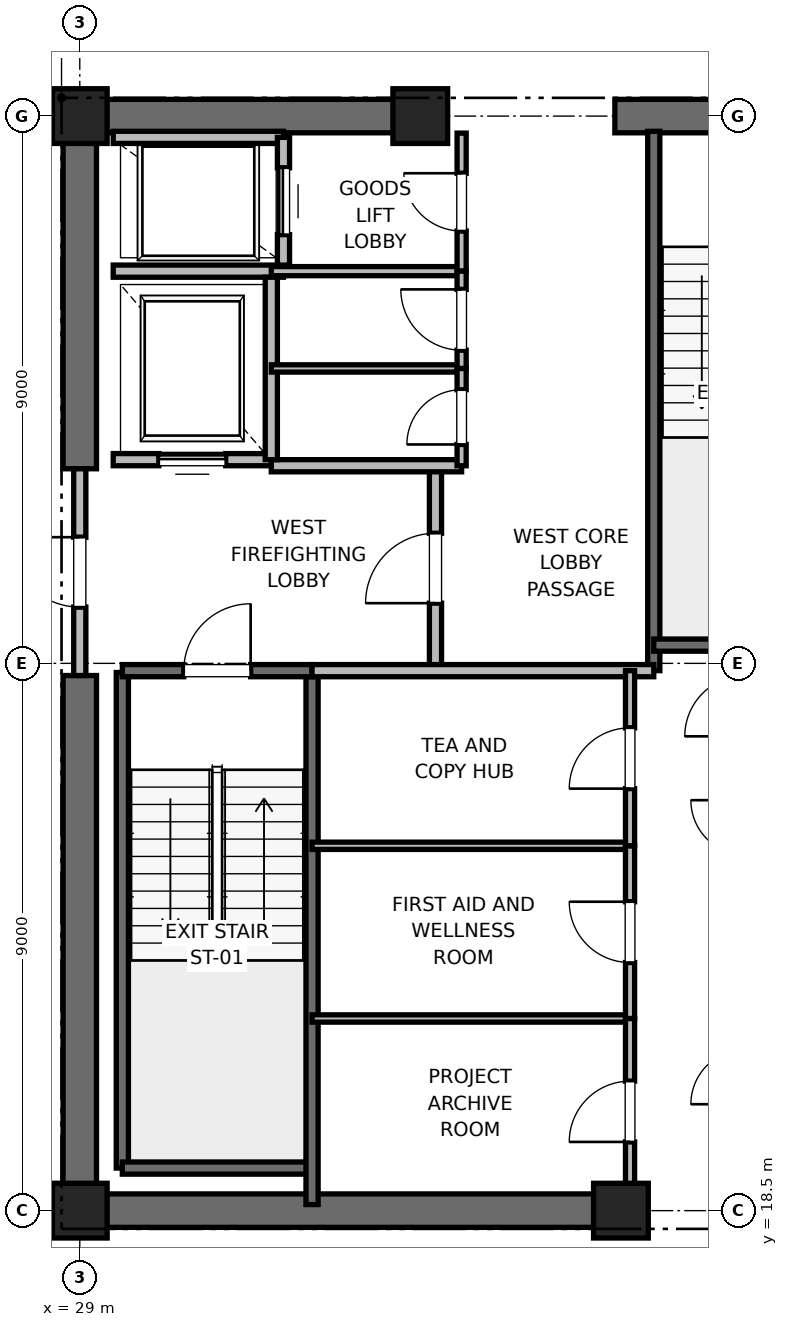
"""IFC4 building model, lengths in metres.
Left out: names, types, materials, properties, quantities, classifications, styles, units other than length and angle.
Written with IfcOpenShell. Run it as: python <this file> out.ifc"""

import sys

from ifc_helpers import new_model, si_unit, direction, frame, frame_2d, origin, origin_2d, place, context, subcontext, project, spatial, rectangle, extrude, element, fill, save


model = new_model("IFC4")
c1 = context("Model", 3, precision=1e-05, world=origin(), true_north=direction((0.0, 1.0)))
c2 = subcontext(c1, "Body", "Model", "MODEL_VIEW")
j1 = project(units=[si_unit("LENGTHUNIT", "METRE"), si_unit("PLANEANGLEUNIT", "RADIAN")], contexts=[c1])
p1 = place(None, origin())
s1 = spatial("IfcSite", under=j1, at=p1, CompositionType="ELEMENT")
p2 = place(p1, origin())
s2 = spatial("IfcBuilding", under=s1, at=p2, CompositionType="ELEMENT")
p3 = place(p2, frame((0.0, 0.0, 209.2)))
s3 = spatial("IfcBuildingStorey", under=s2, at=p3, CompositionType="ELEMENT", Elevation=209.2)
for number, where, z_axis, x_axis in (
    (1, (29.0, 18.5, 0.0), (0.0, 0.0, 1.0), (1.0, 0.0, 0.0)),
    (2, (29.0, 36.5, 0.0), (0.0, 0.0, 1.0), (1.0, 0.0, 0.0)),
    (3, (37.9, 18.5, 0.0), (0.0, 0.0, 1.0), (1.0, 0.0, 0.0)),
    (4, (34.6, 36.5, 0.0), (0.0, 0.0, 1.0), (1.0, 0.0, 0.0)),
):
    element("IfcColumn", number, at=place(p3, frame(where, z_axis=z_axis, x_axis=x_axis)), inside=s3, PredefinedType="PILASTER", context=c2, shape_type="SweptSolid", body=[
        extrude(rectangle(XDim=0.9, YDim=0.9, at=origin_2d()), origin(), (0.0, 0.0, 1.0), 4.0),
    ])
p4 = place(p3, frame((29.0, 18.5, 0.0), z_axis=(0.0, 0.0, 1.0), x_axis=(1.0, 0.0, 0.0)))
e5 = element("IfcWall", 5, at=p4, inside=s3, PredefinedType="SHEAR", context=c2, shape_type="SweptSolid", body=[
    extrude(rectangle(XDim=9.2, YDim=0.55, at=frame_2d((4.6, 0.0))), origin(), (0.0, 0.0, 1.0), 3.775),
])
p5 = place(p3, frame((29.0, 36.5, 0.0), z_axis=(0.0, 0.0, 1.0), x_axis=(1.0, 0.0, 0.0)))
e6 = element("IfcWall", 6, at=p5, inside=s3, PredefinedType="SHEAR", context=c2, shape_type="SweptSolid", body=[
    extrude(rectangle(XDim=5.8, YDim=0.55, at=frame_2d((2.9, 0.0))), origin(), (0.0, 0.0, 1.0), 3.775),
])
p6 = place(p3, frame((37.8, 36.5, 0.0), z_axis=(0.0, 0.0, 1.0), x_axis=(1.0, 0.0, 0.0)))
e7 = element("IfcWall", 7, at=p6, inside=s3, PredefinedType="SHEAR", context=c2, shape_type="SweptSolid", body=[
    extrude(rectangle(XDim=4.4, YDim=0.55, at=frame_2d((2.2, 0.0))), origin(), (0.0, 0.0, 1.0), 3.775),
])
p7 = place(p6, frame((1.65, 0.0, 0.0)))
e8 = element("IfcOpeningElement", 8, at=p7, cuts=e7, PredefinedType="OPENING", context=c2, shape_type="SweptSolid", body=[
    extrude(rectangle(XDim=1.1, YDim=2.15, at=frame_2d((0.55, 1.075))), frame((0.0, 0.275, 0.0), z_axis=(0.0, -1.0, 0.0), x_axis=(1.0, 0.0, 0.0)), (0.0, 0.0, 1.0), 0.55),
])
p8 = place(p3, frame((29.0, 18.5, 0.0), z_axis=(0.0, 0.0, 1.0), x_axis=(0.0, 1.0, 0.0)))
e9 = element("IfcWall", 9, at=p8, inside=s3, PredefinedType="SHEAR", context=c2, shape_type="SweptSolid", body=[
    extrude(rectangle(XDim=8.8, YDim=0.55, at=frame_2d((4.4, 0.0))), origin(), (0.0, 0.0, 1.0), 3.775),
])
p9 = place(p3, frame((29.0, 30.7, 0.0), z_axis=(0.0, 0.0, 1.0), x_axis=(0.0, 1.0, 0.0)))
e10 = element("IfcWall", 10, at=p9, inside=s3, PredefinedType="SHEAR", context=c2, shape_type="SweptSolid", body=[
    extrude(rectangle(XDim=5.8, YDim=0.55, at=frame_2d((2.9, 0.0))), origin(), (0.0, 0.0, 1.0), 3.775),
])
p10 = place(p3, frame((29.7, 19.2, 0.0), z_axis=(0.0, 0.0, 1.0), x_axis=(0.0, 1.0, 0.0)))
e11 = element("IfcWall", 11, at=p10, inside=s3, PredefinedType="SOLIDWALL", context=c2, shape_type="SweptSolid", body=[
    extrude(rectangle(XDim=8.15, YDim=0.2, at=frame_2d((4.075, 0.0))), origin(), (0.0, 0.0, 1.0), 3.775),
])
p11 = place(p3, frame((29.7, 19.2, 0.0), z_axis=(0.0, 0.0, 1.0), x_axis=(1.0, 0.0, 0.0)))
e12 = element("IfcWall", 12, at=p11, inside=s3, PredefinedType="SOLIDWALL", context=c2, shape_type="SweptSolid", body=[
    extrude(rectangle(XDim=3.12, YDim=0.2, at=frame_2d((1.56, 0.0))), origin(), (0.0, 0.0, 1.0), 3.775),
])
p12 = place(p3, frame((32.82, 18.6, 0.0), z_axis=(0.0, 0.0, 1.0), x_axis=(0.0, 1.0, 0.0)))
e13 = element("IfcWall", 13, at=p12, inside=s3, PredefinedType="SOLIDWALL", context=c2, shape_type="SweptSolid", body=[
    extrude(rectangle(XDim=8.78, YDim=0.2, at=frame_2d((4.39, 0.0))), origin(), (0.0, 0.0, 1.0), 3.775),
])
p13 = place(p3, frame((29.7, 27.38, 0.0), z_axis=(0.0, 0.0, 1.0), x_axis=(1.0, 0.0, 0.0)))
e14 = element("IfcWall", 14, at=p13, inside=s3, PredefinedType="SOLIDWALL", context=c2, shape_type="SweptSolid", body=[
    extrude(rectangle(XDim=3.12, YDim=0.2, at=frame_2d((1.56, 0.0))), origin(), (0.0, 0.0, 1.0), 3.775),
])
p14 = place(p13, frame((1.01, 0.0, 0.0)))
e15 = element("IfcOpeningElement", 15, at=p14, cuts=e14, PredefinedType="OPENING", context=c2, shape_type="SweptSolid", body=[
    extrude(rectangle(XDim=1.1, YDim=2.15, at=frame_2d((0.55, 1.075))), frame((0.0, 0.1, 0.0), z_axis=(0.0, -1.0, 0.0), x_axis=(1.0, 0.0, 0.0)), (0.0, 0.0, 1.0), 0.2),
])
p15 = place(p3, frame((38.44, 27.38, 0.0), z_axis=(0.0, 0.0, 1.0), x_axis=(0.0, 1.0, 0.0)))
e16 = element("IfcWall", 16, at=p15, inside=s3, PredefinedType="SOLIDWALL", context=c2, shape_type="SweptSolid", body=[
    extrude(rectangle(XDim=8.87, YDim=0.2, at=frame_2d((4.435, 0.0))), origin(), (0.0, 0.0, 1.0), 3.775),
])
p16 = place(p3, frame((38.44, 27.8, 0.0), z_axis=(0.0, 0.0, 1.0), x_axis=(1.0, 0.0, 0.0)))
e17 = element("IfcWall", 17, at=p16, inside=s3, PredefinedType="SOLIDWALL", context=c2, shape_type="SweptSolid", body=[
    extrude(rectangle(XDim=3.32, YDim=0.2, at=frame_2d((1.66, 0.0))), origin(), (0.0, 0.0, 1.0), 3.775),
])
p17 = place(p3, frame((34.85, 27.38, 0.0), z_axis=(0.0, 0.0, 1.0), x_axis=(0.0, 1.0, 0.0)))
e18 = element("IfcWall", 18, at=p17, inside=s3, PredefinedType="PARTITIONING", context=c2, shape_type="SweptSolid", body=[
    extrude(rectangle(XDim=3.37, YDim=0.2, at=frame_2d((1.685, 0.0))), origin(), (0.0, 0.0, 1.0), 3.775),
])
p18 = place(p17, frame((1.11, 0.0, 0.0)))
e19 = element("IfcOpeningElement", 19, at=p18, cuts=e18, PredefinedType="OPENING", context=c2, shape_type="SweptSolid", body=[
    extrude(rectangle(XDim=1.15, YDim=2.2, at=frame_2d((0.575, 1.1))), frame((0.0, 0.1, 0.0), z_axis=(0.0, -1.0, 0.0), x_axis=(1.0, 0.0, 0.0)), (0.0, 0.0, 1.0), 0.2),
])
p19 = place(p3, frame((29.0, 27.3, 0.0), z_axis=(0.0, 0.0, 1.0), x_axis=(0.0, 1.0, 0.0)))
e20 = element("IfcWall", 20, at=p19, inside=s3, PredefinedType="PARTITIONING", context=c2, shape_type="SweptSolid", body=[
    extrude(rectangle(XDim=3.4, YDim=0.2, at=frame_2d((1.7, 0.0))), origin(), (0.0, 0.0, 1.0), 2.755),
])
p20 = place(p19, frame((1.125, 0.0, 0.0)))
e21 = element("IfcOpeningElement", 21, at=p20, cuts=e20, PredefinedType="OPENING", context=c2, shape_type="SweptSolid", body=[
    extrude(rectangle(XDim=1.15, YDim=2.2, at=frame_2d((0.575, 1.1))), frame((0.0, 0.1, 0.0), z_axis=(0.0, -1.0, 0.0), x_axis=(1.0, 0.0, 0.0)), (0.0, 0.0, 1.0), 0.2),
])
p21 = place(p3, frame((32.82, 27.38, 0.0), z_axis=(0.0, 0.0, 1.0), x_axis=(1.0, 0.0, 0.0)))
e22 = element("IfcWall", 22, at=p21, inside=s3, PredefinedType="PARTITIONING", context=c2, shape_type="SweptSolid", body=[
    extrude(rectangle(XDim=5.62, YDim=0.2, at=frame_2d((2.81, 0.0))), origin(), (0.0, 0.0, 1.0), 3.775),
])
p22 = place(p3, frame((32.15, 30.75, 0.0), z_axis=(0.0, 0.0, 1.0), x_axis=(1.0, 0.0, 0.0)))
e23 = element("IfcWall", 23, at=p22, inside=s3, PredefinedType="PARTITIONING", context=c2, shape_type="SweptSolid", body=[
    extrude(rectangle(XDim=3.13, YDim=0.2, at=frame_2d((1.565, 0.0))), origin(), (0.0, 0.0, 1.0), 3.775),
])
p23 = place(p3, frame((29.55, 30.85, 0.0), z_axis=(0.0, 0.0, 1.0), x_axis=(1.0, 0.0, 0.0)))
e24 = element("IfcWall", 24, at=p23, inside=s3, PredefinedType="SOLIDWALL", context=c2, shape_type="SweptSolid", body=[
    extrude(rectangle(XDim=2.6, YDim=0.2, at=frame_2d((1.3, 0.0))), origin(), (0.0, 0.0, 1.0), 2.755),
])
p24 = place(p23, frame((0.75, 0.0, 0.0)))
e25 = element("IfcOpeningElement", 25, at=p24, cuts=e24, PredefinedType="OPENING", context=c2, shape_type="SweptSolid", body=[
    extrude(rectangle(XDim=1.1, YDim=2.2, at=frame_2d((0.55, 1.1))), frame((0.0, 0.1, 0.0), z_axis=(0.0, -1.0, 0.0), x_axis=(1.0, 0.0, 0.0)), (0.0, 0.0, 1.0), 0.2),
])
p25 = place(p3, frame((29.55, 33.95, 0.0), z_axis=(0.0, 0.0, 1.0), x_axis=(1.0, 0.0, 0.0)))
e26 = element("IfcWall", 26, at=p25, inside=s3, PredefinedType="SOLIDWALL", context=c2, shape_type="SweptSolid", body=[
    extrude(rectangle(XDim=2.8, YDim=0.2, at=frame_2d((1.4, 0.0))), origin(), (0.0, 0.0, 1.0), 3.775),
])
p26 = place(p3, frame((32.15, 30.85, 0.0), z_axis=(0.0, 0.0, 1.0), x_axis=(0.0, 1.0, 0.0)))
e27 = element("IfcWall", 27, at=p26, inside=s3, PredefinedType="SOLIDWALL", context=c2, shape_type="SweptSolid", body=[
    extrude(rectangle(XDim=3.0, YDim=0.2, at=frame_2d((1.5, 0.0))), origin(), (0.0, 0.0, 1.0), 3.775),
])
p27 = place(p3, frame((32.35, 36.15, 0.0), z_axis=(0.0, 0.0, 1.0), x_axis=(-1.0, 0.0, 0.0)))
e28 = element("IfcWall", 28, at=p27, inside=s3, PredefinedType="SOLIDWALL", context=c2, shape_type="SweptSolid", body=[
    extrude(rectangle(XDim=2.8, YDim=0.2, at=frame_2d((1.4, 0.0))), origin(), (0.0, 0.0, 1.0), 3.062),
])
p28 = place(p3, frame((32.35, 34.05, 0.0), z_axis=(0.0, 0.0, 1.0), x_axis=(0.0, 1.0, 0.0)))
e29 = element("IfcWall", 29, at=p28, inside=s3, PredefinedType="SOLIDWALL", context=c2, shape_type="SweptSolid", body=[
    extrude(rectangle(XDim=2.1, YDim=0.2, at=frame_2d((1.05, 0.0))), origin(), (0.0, 0.0, 1.0), 3.775),
])
p29 = place(p28, frame((0.5, 0.0, 0.0)))
e30 = element("IfcOpeningElement", 30, at=p29, cuts=e29, PredefinedType="OPENING", context=c2, shape_type="SweptSolid", body=[
    extrude(rectangle(XDim=1.1, YDim=2.2, at=frame_2d((0.55, 1.1))), frame((0.0, 0.1, 0.0), z_axis=(0.0, -1.0, 0.0), x_axis=(1.0, 0.0, 0.0)), (0.0, 0.0, 1.0), 0.2),
])
p30 = place(p3, frame((32.15, 33.95, 0.0), z_axis=(0.0, 0.0, 1.0), x_axis=(1.0, 0.0, 0.0)))
e31 = element("IfcWall", 31, at=p30, inside=s3, PredefinedType="PARTITIONING", context=c2, shape_type="SweptSolid", body=[
    extrude(rectangle(XDim=3.13, YDim=0.15, at=frame_2d((1.565, 0.0))), origin(), (0.0, 0.0, 1.0), 2.85),
])
p31 = place(p3, frame((35.28, 33.95, 0.0), z_axis=(0.0, 0.0, 1.0), x_axis=(0.0, 1.0, 0.0)))
e32 = element("IfcWall", 32, at=p31, inside=s3, PredefinedType="PARTITIONING", context=c2, shape_type="SweptSolid", body=[
    extrude(rectangle(XDim=2.27, YDim=0.15, at=frame_2d((1.135, 0.0))), origin(), (0.0, 0.0, 1.0), 2.755),
])
p32 = place(p31, frame((0.66, 0.0, 0.0)))
e33 = element("IfcOpeningElement", 33, at=p32, cuts=e32, PredefinedType="OPENING", context=c2, shape_type="SweptSolid", body=[
    extrude(rectangle(XDim=0.95, YDim=2.15, at=frame_2d((0.475, 1.075))), frame((0.0, 0.075, 0.0), z_axis=(0.0, -1.0, 0.0), x_axis=(1.0, 0.0, 0.0)), (0.0, 0.0, 1.0), 0.15),
])
p33 = place(p3, frame((32.15, 32.35, 0.0), z_axis=(0.0, 0.0, 1.0), x_axis=(1.0, 0.0, 0.0)))
e34 = element("IfcWall", 34, at=p33, inside=s3, PredefinedType="PARTITIONING", context=c2, shape_type="SweptSolid", body=[
    extrude(rectangle(XDim=3.13, YDim=0.12, at=frame_2d((1.565, 0.0))), origin(), (0.0, 0.0, 1.0), 2.85),
])
p34 = place(p3, frame((35.28, 30.75, 0.0), z_axis=(0.0, 0.0, 1.0), x_axis=(0.0, 1.0, 0.0)))
e35 = element("IfcWall", 35, at=p34, inside=s3, PredefinedType="PARTITIONING", context=c2, shape_type="SweptSolid", body=[
    extrude(rectangle(XDim=1.6, YDim=0.15, at=frame_2d((0.8, 0.0))), origin(), (0.0, 0.0, 1.0), 2.85),
])
p35 = place(p34, frame((0.35, 0.0, 0.0)))
e36 = element("IfcOpeningElement", 36, at=p35, cuts=e35, PredefinedType="OPENING", context=c2, shape_type="SweptSolid", body=[
    extrude(rectangle(XDim=0.9, YDim=2.1, at=frame_2d((0.45, 1.05))), frame((0.0, 0.075, 0.0), z_axis=(0.0, -1.0, 0.0), x_axis=(1.0, 0.0, 0.0)), (0.0, 0.0, 1.0), 0.15),
])
p36 = place(p3, frame((35.28, 32.35, 0.0), z_axis=(0.0, 0.0, 1.0), x_axis=(0.0, 1.0, 0.0)))
e37 = element("IfcWall", 37, at=p36, inside=s3, PredefinedType="PARTITIONING", context=c2, shape_type="SweptSolid", body=[
    extrude(rectangle(XDim=1.6, YDim=0.15, at=frame_2d((0.8, 0.0))), origin(), (0.0, 0.0, 1.0), 2.85),
])
p37 = place(p36, frame((0.3, 0.0, 0.0)))
e38 = element("IfcOpeningElement", 38, at=p37, cuts=e37, PredefinedType="OPENING", context=c2, shape_type="SweptSolid", body=[
    extrude(rectangle(XDim=1.0, YDim=2.15, at=frame_2d((0.5, 1.075))), frame((0.0, 0.075, 0.0), z_axis=(0.0, -1.0, 0.0), x_axis=(1.0, 0.0, 0.0)), (0.0, 0.0, 1.0), 0.15),
])
for number, where, z_axis, x_axis in (
    (39, (32.82, 21.66, 0.0), (0.0, 0.0, 1.0), (1.0, 0.0, 0.0)),
    (40, (32.82, 24.5, 0.0), (0.0, 0.0, 1.0), (1.0, 0.0, 0.0)),
):
    element("IfcWall", number, at=place(p3, frame(where, z_axis=z_axis, x_axis=x_axis)), inside=s3, PredefinedType="PARTITIONING", context=c2, shape_type="SweptSolid", body=[
        extrude(rectangle(XDim=5.23, YDim=0.12, at=frame_2d((2.615, 0.0))), origin(), (0.0, 0.0, 1.0), 2.85),
    ])
p38 = place(p3, frame((38.05, 18.6, 0.0), z_axis=(0.0, 0.0, 1.0), x_axis=(0.0, 1.0, 0.0)))
e41 = element("IfcWall", 41, at=p38, inside=s3, PredefinedType="PARTITIONING", context=c2, shape_type="SweptSolid", body=[
    extrude(rectangle(XDim=3.06, YDim=0.15, at=frame_2d((1.53, 0.0))), origin(), (0.0, 0.0, 1.0), 2.755),
])
p39 = place(p38, frame((1.03, 0.0, 0.0)))
e42 = element("IfcOpeningElement", 42, at=p39, cuts=e41, PredefinedType="OPENING", context=c2, shape_type="SweptSolid", body=[
    extrude(rectangle(XDim=1.0, YDim=2.15, at=frame_2d((0.5, 1.075))), frame((0.0, 0.075, 0.0), z_axis=(0.0, -1.0, 0.0), x_axis=(1.0, 0.0, 0.0)), (0.0, 0.0, 1.0), 0.15),
])
p40 = place(p3, frame((38.05, 21.66, 0.0), z_axis=(0.0, 0.0, 1.0), x_axis=(0.0, 1.0, 0.0)))
e43 = element("IfcWall", 43, at=p40, inside=s3, PredefinedType="PARTITIONING", context=c2, shape_type="SweptSolid", body=[
    extrude(rectangle(XDim=2.84, YDim=0.15, at=frame_2d((1.42, 0.0))), origin(), (0.0, 0.0, 1.0), 2.85),
])
p41 = place(p40, frame((0.92, 0.0, 0.0)))
e44 = element("IfcOpeningElement", 44, at=p41, cuts=e43, PredefinedType="OPENING", context=c2, shape_type="SweptSolid", body=[
    extrude(rectangle(XDim=1.0, YDim=2.15, at=frame_2d((0.5, 1.075))), frame((0.0, 0.075, 0.0), z_axis=(0.0, -1.0, 0.0), x_axis=(1.0, 0.0, 0.0)), (0.0, 0.0, 1.0), 0.15),
])
p42 = place(p3, frame((38.05, 24.5, 0.0), z_axis=(0.0, 0.0, 1.0), x_axis=(0.0, 1.0, 0.0)))
e45 = element("IfcWall", 45, at=p42, inside=s3, PredefinedType="PARTITIONING", context=c2, shape_type="SweptSolid", body=[
    extrude(rectangle(XDim=2.88, YDim=0.15, at=frame_2d((1.44, 0.0))), origin(), (0.0, 0.0, 1.0), 2.85),
])
p43 = place(p42, frame((0.94, 0.0, 0.0)))
e46 = element("IfcOpeningElement", 46, at=p43, cuts=e45, PredefinedType="OPENING", context=c2, shape_type="SweptSolid", body=[
    extrude(rectangle(XDim=1.0, YDim=2.15, at=frame_2d((0.5, 1.075))), frame((0.0, 0.075, 0.0), z_axis=(0.0, -1.0, 0.0), x_axis=(1.0, 0.0, 0.0)), (0.0, 0.0, 1.0), 0.15),
])
p44 = place(p14, origin())
e47 = element("IfcDoor", 47, at=p44, inside=s3, OperationType="SINGLE_SWING_RIGHT", PredefinedType="DOOR", context=c2, shape_type="SweptSolid", body=[
    extrude(rectangle(XDim=1.1, YDim=2.15, at=frame_2d((0.55, 1.075))), frame((0.0, 0.025, 0.0), z_axis=(0.0, -1.0, 0.0), x_axis=(1.0, 0.0, 0.0)), (0.0, 0.0, 1.0), 0.05),
])
fill(e15, e47)
p45 = place(p18, origin())
e48 = element("IfcDoor", 48, at=p45, inside=s3, OperationType="SINGLE_SWING_LEFT", PredefinedType="DOOR", context=c2, shape_type="SweptSolid", body=[
    extrude(rectangle(XDim=1.15, YDim=2.2, at=frame_2d((0.575, 1.1))), frame((0.0, 0.025, 0.0), z_axis=(0.0, -1.0, 0.0), x_axis=(1.0, 0.0, 0.0)), (0.0, 0.0, 1.0), 0.05),
])
fill(e19, e48)
p46 = place(p20, origin())
e49 = element("IfcDoor", 49, at=p46, inside=s3, OperationType="SINGLE_SWING_RIGHT", PredefinedType="DOOR", context=c2, shape_type="SweptSolid", body=[
    extrude(rectangle(XDim=1.15, YDim=2.2, at=frame_2d((0.575, 1.1))), frame((0.0, 0.025, 0.0), z_axis=(0.0, -1.0, 0.0), x_axis=(1.0, 0.0, 0.0)), (0.0, 0.0, 1.0), 0.05),
])
fill(e21, e49)
p47 = place(p24, origin())
e50 = element("IfcDoor", 50, at=p47, inside=s3, OperationType="SLIDING_TO_RIGHT", PredefinedType="DOOR", context=c2, shape_type="SweptSolid", body=[
    extrude(rectangle(XDim=1.1, YDim=2.2, at=frame_2d((0.55, 1.1))), frame((0.0, 0.025, 0.0), z_axis=(0.0, -1.0, 0.0), x_axis=(1.0, 0.0, 0.0)), (0.0, 0.0, 1.0), 0.05),
])
fill(e25, e50)
p48 = place(p29, origin())
e51 = element("IfcDoor", 51, at=p48, inside=s3, OperationType="SLIDING_TO_RIGHT", PredefinedType="DOOR", context=c2, shape_type="SweptSolid", body=[
    extrude(rectangle(XDim=1.1, YDim=2.2, at=frame_2d((0.55, 1.1))), frame((0.0, 0.025, 0.0), z_axis=(0.0, -1.0, 0.0), x_axis=(1.0, 0.0, 0.0)), (0.0, 0.0, 1.0), 0.05),
])
fill(e30, e51)
p49 = place(p32, origin())
e52 = element("IfcDoor", 52, at=p49, inside=s3, OperationType="SINGLE_SWING_RIGHT", PredefinedType="DOOR", context=c2, shape_type="SweptSolid", body=[
    extrude(rectangle(XDim=0.95, YDim=2.15, at=frame_2d((0.475, 1.075))), frame((0.0, 0.025, 0.0), z_axis=(0.0, -1.0, 0.0), x_axis=(1.0, 0.0, 0.0)), (0.0, 0.0, 1.0), 0.05),
])
fill(e33, e52)
p50 = place(p35, origin())
e53 = element("IfcDoor", 53, at=p50, inside=s3, OperationType="SINGLE_SWING_LEFT", PredefinedType="DOOR", context=c2, shape_type="SweptSolid", body=[
    extrude(rectangle(XDim=0.9, YDim=2.1, at=frame_2d((0.45, 1.05))), frame((0.0, 0.025, 0.0), z_axis=(0.0, -1.0, 0.0), x_axis=(1.0, 0.0, 0.0)), (0.0, 0.0, 1.0), 0.05),
])
fill(e36, e53)
p51 = place(p37, origin())
e54 = element("IfcDoor", 54, at=p51, inside=s3, OperationType="SINGLE_SWING_RIGHT", PredefinedType="DOOR", context=c2, shape_type="SweptSolid", body=[
    extrude(rectangle(XDim=1.0, YDim=2.15, at=frame_2d((0.5, 1.075))), frame((0.0, 0.025, 0.0), z_axis=(0.0, -1.0, 0.0), x_axis=(1.0, 0.0, 0.0)), (0.0, 0.0, 1.0), 0.05),
])
fill(e38, e54)
p52 = place(p39, origin())
e55 = element("IfcDoor", 55, at=p52, inside=s3, OperationType="SINGLE_SWING_LEFT", PredefinedType="DOOR", context=c2, shape_type="SweptSolid", body=[
    extrude(rectangle(XDim=1.0, YDim=2.15, at=frame_2d((0.5, 1.075))), frame((0.0, 0.025, 0.0), z_axis=(0.0, -1.0, 0.0), x_axis=(1.0, 0.0, 0.0)), (0.0, 0.0, 1.0), 0.05),
])
fill(e42, e55)
p53 = place(p41, origin())
e56 = element("IfcDoor", 56, at=p53, inside=s3, OperationType="SINGLE_SWING_RIGHT", PredefinedType="DOOR", context=c2, shape_type="SweptSolid", body=[
    extrude(rectangle(XDim=1.0, YDim=2.15, at=frame_2d((0.5, 1.075))), frame((0.0, 0.025, 0.0), z_axis=(0.0, -1.0, 0.0), x_axis=(1.0, 0.0, 0.0)), (0.0, 0.0, 1.0), 0.05),
])
fill(e44, e56)
p54 = place(p43, origin())
e57 = element("IfcDoor", 57, at=p54, inside=s3, OperationType="SINGLE_SWING_LEFT", PredefinedType="DOOR", context=c2, shape_type="SweptSolid", body=[
    extrude(rectangle(XDim=1.0, YDim=2.15, at=frame_2d((0.5, 1.075))), frame((0.0, 0.025, 0.0), z_axis=(0.0, -1.0, 0.0), x_axis=(1.0, 0.0, 0.0)), (0.0, 0.0, 1.0), 0.05),
])
fill(e46, e57)
save(model, sys.argv[1])
